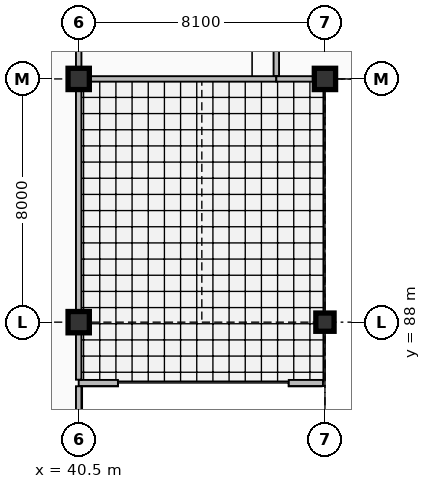
"""IFC4 building model, lengths in metres.
Left out: names, types, materials, properties, quantities, classifications, styles, units other than length and angle.
Written with IfcOpenShell. Run it as: python <this file> out.ifc"""

import sys

from ifc_helpers import new_model, si_unit, direction, frame, frame_2d, origin, origin_2d, place, context, subcontext, project, spatial, rectangle, extrude, element, fill, save


model = new_model("IFC4")
c1 = context("Model", 3, precision=1e-05, world=origin(), true_north=direction((0.0, 1.0)))
c2 = subcontext(c1, "Body", "Model", "MODEL_VIEW")
j1 = project(units=[si_unit("LENGTHUNIT", "METRE"), si_unit("PLANEANGLEUNIT", "RADIAN")], contexts=[c1])
p1 = place(None, origin())
s1 = spatial("IfcSite", under=j1, at=p1, CompositionType="ELEMENT")
p2 = place(p1, origin())
s2 = spatial("IfcBuilding", under=s1, at=p2, CompositionType="ELEMENT")
p3 = place(p2, frame((0.0, 0.0, 10.2)))
s3 = spatial("IfcBuildingStorey", under=s2, at=p3, CompositionType="ELEMENT", Elevation=10.2)
for number, where, z_axis, x_axis in (
    (1, (40.5, 88.0, 0.0), (0.0, 0.0, 1.0), (1.0, 0.0, 0.0)),
    (2, (40.5, 96.0, 0.0), (0.0, 0.0, 1.0), (1.0, 0.0, 0.0)),
):
    element("IfcColumn", number, at=place(p3, frame(where, z_axis=z_axis, x_axis=x_axis)), inside=s3, PredefinedType="COLUMN", context=c2, shape_type="SweptSolid", body=[
        extrude(rectangle(XDim=0.7, YDim=0.7, at=origin_2d()), origin(), (0.0, 0.0, 1.0), 4.5),
    ])
p4 = place(p3, frame((48.6, 88.0, 0.0), z_axis=(0.0, 0.0, 1.0), x_axis=(1.0, 0.0, 0.0)))
e3 = element("IfcColumn", 3, at=p4, inside=s3, PredefinedType="COLUMN", context=c2, shape_type="SweptSolid", body=[
    extrude(rectangle(XDim=0.6, YDim=0.6, at=origin_2d()), origin(), (0.0, 0.0, 1.0), 4.5),
])
p5 = place(p3, frame((48.6, 96.0, 0.0), z_axis=(0.0, 0.0, 1.0), x_axis=(1.0, 0.0, 0.0)))
e4 = element("IfcColumn", 4, at=p5, inside=s3, PredefinedType="COLUMN", context=c2, shape_type="SweptSolid", body=[
    extrude(rectangle(XDim=0.7, YDim=0.7, at=origin_2d()), origin(), (0.0, 0.0, 1.0), 4.5),
])
p6 = place(p3, frame((40.5, 86.0, 0.0), z_axis=(0.0, 0.0, 1.0), x_axis=(1.0, 0.0, 0.0)))
e5 = element("IfcWall", 5, at=p6, inside=s3, PredefinedType="PARTITIONING", context=c2, shape_type="SweptSolid", body=[
    extrude(rectangle(XDim=1.29, YDim=0.2, at=frame_2d((0.645, 0.0))), origin(), (0.0, 0.0, 1.0), 4.24),
])
p7 = place(p3, frame((47.41, 86.0, 0.0), z_axis=(0.0, 0.0, 1.0), x_axis=(1.0, 0.0, 0.0)))
e6 = element("IfcWall", 6, at=p7, inside=s3, PredefinedType="PARTITIONING", context=c2, shape_type="SweptSolid", body=[
    extrude(rectangle(XDim=1.125, YDim=0.2, at=frame_2d((0.562, 0.0))), origin(), (0.0, 0.0, 1.0), 4.24),
])
p8 = place(p3, frame((40.858, 96.0, 0.0), z_axis=(0.0, 0.0, 1.0), x_axis=(1.0, 0.0, 0.0)))
e7 = element("IfcWall", 7, at=p8, inside=s3, PredefinedType="PARTITIONING", context=c2, shape_type="SweptSolid", body=[
    extrude(rectangle(XDim=6.142, YDim=0.18, at=frame_2d((3.071, 0.0))), origin(), (0.0, 0.0, 1.0), 3.632),
])
p9 = place(p3, frame((47.0, 96.0, 0.0), z_axis=(0.0, 0.0, 1.0), x_axis=(1.0, 0.0, 0.0)))
e8 = element("IfcWall", 8, at=p9, inside=s3, PredefinedType="PARTITIONING", context=c2, shape_type="SweptSolid", body=[
    extrude(rectangle(XDim=1.242, YDim=0.18, at=frame_2d((0.621, 0.0))), origin(), (0.0, 0.0, 1.0), 3.632),
])
p10 = place(p3, frame((40.5, 80.358, 0.0), z_axis=(0.0, 0.0, 1.0), x_axis=(0.0, 1.0, 0.0)))
e9 = element("IfcWall", 9, at=p10, inside=s3, PredefinedType="PARTITIONING", context=c2, shape_type="SweptSolid", body=[
    extrude(rectangle(XDim=5.534, YDim=0.18, at=frame_2d((2.767, 0.0))), origin(), (0.0, 0.0, 1.0), 3.769),
])
p11 = place(p3, frame((40.5, 86.108, 0.0), z_axis=(0.0, 0.0, 1.0), x_axis=(0.0, 1.0, 0.0)))
e10 = element("IfcWall", 10, at=p11, inside=s3, PredefinedType="PARTITIONING", context=c2, shape_type="SweptSolid", body=[
    extrude(rectangle(XDim=1.534, YDim=0.18, at=frame_2d((0.767, 0.0))), origin(), (0.0, 0.0, 1.0), 3.769),
])
p12 = place(p3, frame((40.5, 88.358, 0.0), z_axis=(0.0, 0.0, 1.0), x_axis=(0.0, 1.0, 0.0)))
e11 = element("IfcWall", 11, at=p12, inside=s3, PredefinedType="PARTITIONING", context=c2, shape_type="SweptSolid", body=[
    extrude(rectangle(XDim=7.284, YDim=0.18, at=frame_2d((3.642, 0.0))), origin(), (0.0, 0.0, 1.0), 3.732),
])
p13 = place(p12, frame((3.092, 0.0, 0.0)))
e12 = element("IfcOpeningElement", 12, at=p13, cuts=e11, PredefinedType="OPENING", context=c2, shape_type="SweptSolid", body=[
    extrude(rectangle(XDim=1.1, YDim=2.2, at=frame_2d((0.55, 1.1))), frame((0.0, 0.1, 0.0), z_axis=(0.0, -1.0, 0.0), x_axis=(1.0, 0.0, 0.0)), (0.0, 0.0, 1.0), 0.2),
])
p14 = place(p3, frame((40.5, 96.358, 0.0), z_axis=(0.0, 0.0, 1.0), x_axis=(0.0, 1.0, 0.0)))
e13 = element("IfcWall", 13, at=p14, inside=s3, PredefinedType="PARTITIONING", context=c2, shape_type="SweptSolid", body=[
    extrude(rectangle(XDim=7.284, YDim=0.18, at=frame_2d((3.642, 0.0))), origin(), (0.0, 0.0, 1.0), 3.769),
])
p15 = place(p14, frame((3.042, 0.0, 0.0)))
e14 = element("IfcOpeningElement", 14, at=p15, cuts=e13, PredefinedType="OPENING", context=c2, shape_type="SweptSolid", body=[
    extrude(rectangle(XDim=1.2, YDim=2.2, at=frame_2d((0.6, 1.1))), frame((0.0, 0.1, 0.0), z_axis=(0.0, -1.0, 0.0), x_axis=(1.0, 0.0, 0.0)), (0.0, 0.0, 1.0), 0.2),
])
p16 = place(p3, frame((47.0, 96.098, 0.0), z_axis=(0.0, 0.0, 1.0), x_axis=(0.0, 1.0, 0.0)))
e15 = element("IfcWall", 15, at=p16, inside=s3, PredefinedType="PARTITIONING", context=c2, shape_type="SweptSolid", body=[
    extrude(rectangle(XDim=4.044, YDim=0.18, at=frame_2d((2.022, 0.0))), origin(), (0.0, 0.0, 1.0), 4.24),
])
p17 = place(p16, frame((1.472, 0.0, 0.0)))
e16 = element("IfcOpeningElement", 16, at=p17, cuts=e15, PredefinedType="OPENING", context=c2, shape_type="SweptSolid", body=[
    extrude(rectangle(XDim=1.1, YDim=2.2, at=frame_2d((0.55, 1.1))), frame((0.0, 0.1, 0.0), z_axis=(0.0, -1.0, 0.0), x_axis=(1.0, 0.0, 0.0)), (0.0, 0.0, 1.0), 0.2),
])
p18 = place(p13, frame((1.1, 0.0, 0.0), z_axis=(0.0, 0.0, 1.0), x_axis=(-1.0, 0.0, 0.0)))
e17 = element("IfcDoor", 17, at=p18, inside=s3, OperationType="SINGLE_SWING_RIGHT", PredefinedType="DOOR", context=c2, shape_type="SweptSolid", body=[
    extrude(rectangle(XDim=1.1, YDim=2.2, at=frame_2d((0.55, 1.1))), frame((0.0, 0.025, 0.0), z_axis=(0.0, -1.0, 0.0), x_axis=(1.0, 0.0, 0.0)), (0.0, 0.0, 1.0), 0.05),
])
fill(e12, e17)
save(model, sys.argv[1])
